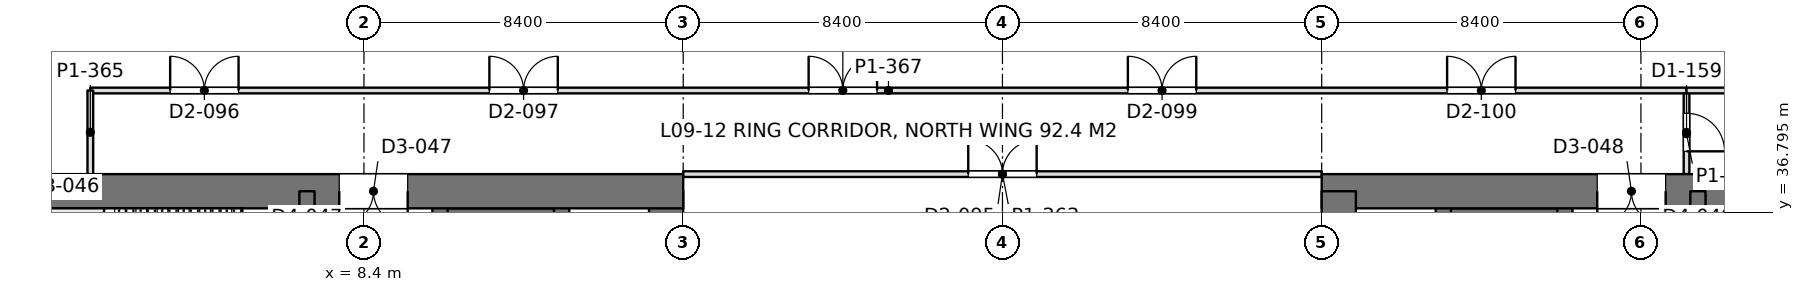
"""IFC4 building model, lengths in metres.
Left out: names, types, materials, properties, quantities, classifications, styles, units other than length and angle.
Written with IfcOpenShell. Run it as: python <this file> out.ifc"""

import sys

from ifc_helpers import new_model, si_unit, direction, frame, frame_2d, origin, place, context, subcontext, project, spatial, rectangle, extrude, element, fill, save


model = new_model("IFC4")
c1 = context("Model", 3, precision=1e-05, world=origin(), true_north=direction((0.0, 1.0)))
c2 = subcontext(c1, "Body", "Model", "MODEL_VIEW")
j1 = project(units=[si_unit("LENGTHUNIT", "METRE"), si_unit("PLANEANGLEUNIT", "RADIAN")], contexts=[c1])
p1 = place(None, origin())
s1 = spatial("IfcSite", under=j1, at=p1, CompositionType="ELEMENT")
p2 = place(p1, origin())
s2 = spatial("IfcBuilding", under=s1, at=p2, CompositionType="ELEMENT")
p3 = place(p2, frame((0.0, 0.0, 41.4)))
s3 = spatial("IfcBuildingStorey", under=s2, at=p3, CompositionType="ELEMENT", Elevation=41.4)
p4 = place(p3, frame((-1.2, 37.35, 0.0), z_axis=(0.0, 0.0, 1.0), x_axis=(1.0, 0.0, 0.0)))
e1 = element("IfcWall", 1, at=p4, inside=s3, PredefinedType="SHEAR", context=c2, shape_type="SweptSolid", body=[
    extrude(rectangle(XDim=18.0, YDim=0.9, at=frame_2d((9.0, 0.0))), origin(), (0.0, 0.0, 1.0), 4.5),
])
p5 = place(p4, frame((8.95, 0.0, 0.0)))
e2 = element("IfcOpeningElement", 2, at=p5, cuts=e1, PredefinedType="OPENING", context=c2, shape_type="SweptSolid", body=[
    extrude(rectangle(XDim=1.8, YDim=2.4, at=frame_2d((0.9, 1.2))), frame((0.0, 0.46, 0.0), z_axis=(0.0, -1.0, 0.0), x_axis=(1.0, 0.0, 0.0)), (0.0, 0.0, 1.0), 0.92),
])
p6 = place(p3, frame((16.35, 13.05, 0.0), z_axis=(0.0, 0.0, 1.0), x_axis=(0.0, 1.0, 0.0)))
e3 = element("IfcWall", 3, at=p6, inside=s3, PredefinedType="SHEAR", context=c2, shape_type="SweptSolid", body=[
    extrude(rectangle(XDim=24.3, YDim=0.9, at=frame_2d((12.15, 0.0))), origin(), (0.0, 0.0, 1.0), 4.5),
])
p7 = place(p3, frame((6.9, 13.05, 0.0), z_axis=(0.0, 0.0, 1.0), x_axis=(0.0, 1.0, 0.0)))
e4 = element("IfcWall", 4, at=p7, inside=s3, PredefinedType="SHEAR", context=c2, shape_type="SweptSolid", body=[
    extrude(rectangle(XDim=24.3, YDim=0.4, at=frame_2d((12.15, 0.0))), origin(), (0.0, 0.0, 1.0), 4.5),
])
p8 = place(p7, frame((1.3, 0.0, 0.0)))
e5 = element("IfcOpeningElement", 5, at=p8, cuts=e4, PredefinedType="OPENING", context=c2, shape_type="SweptSolid", body=[
    extrude(rectangle(XDim=1.0, YDim=2.2, at=frame_2d((0.5, 1.1))), frame((0.0, 0.21, 0.0), z_axis=(0.0, -1.0, 0.0), x_axis=(1.0, 0.0, 0.0)), (0.0, 0.0, 1.0), 0.42),
])
p9 = place(p7, frame((22.0, 0.0, 0.0)))
e6 = element("IfcOpeningElement", 6, at=p9, cuts=e4, PredefinedType="OPENING", context=c2, shape_type="SweptSolid", body=[
    extrude(rectangle(XDim=1.0, YDim=2.2, at=frame_2d((0.5, 1.1))), frame((0.0, 0.21, 0.0), z_axis=(0.0, -1.0, 0.0), x_axis=(1.0, 0.0, 0.0)), (0.0, 0.0, 1.0), 0.42),
])
p10 = place(p7, frame((5.55, 0.0, 0.0)))
e7 = element("IfcOpeningElement", 7, at=p10, cuts=e4, PredefinedType="OPENING", context=c2, shape_type="SweptSolid", body=[
    extrude(rectangle(XDim=1.0, YDim=2.2, at=frame_2d((0.5, 1.1))), frame((0.0, 0.21, 0.0), z_axis=(0.0, -1.0, 0.0), x_axis=(1.0, 0.0, 0.0)), (0.0, 0.0, 1.0), 0.42),
])
p11 = place(p7, frame((9.55, 0.0, 0.0)))
e8 = element("IfcOpeningElement", 8, at=p11, cuts=e4, PredefinedType="OPENING", context=c2, shape_type="SweptSolid", body=[
    extrude(rectangle(XDim=1.0, YDim=2.2, at=frame_2d((0.5, 1.1))), frame((0.0, 0.21, 0.0), z_axis=(0.0, -1.0, 0.0), x_axis=(1.0, 0.0, 0.0)), (0.0, 0.0, 1.0), 0.42),
])
p12 = place(p7, frame((12.8, 0.0, 0.0)))
e9 = element("IfcOpeningElement", 9, at=p12, cuts=e4, PredefinedType="OPENING", context=c2, shape_type="SweptSolid", body=[
    extrude(rectangle(XDim=1.1, YDim=2.2, at=frame_2d((0.55, 1.1))), frame((0.0, 0.21, 0.0), z_axis=(0.0, -1.0, 0.0), x_axis=(1.0, 0.0, 0.0)), (0.0, 0.0, 1.0), 0.42),
])
p13 = place(p7, frame((15.538, 0.0, 0.0)))
e10 = element("IfcOpeningElement", 10, at=p13, cuts=e4, PredefinedType="OPENING", context=c2, shape_type="SweptSolid", body=[
    extrude(rectangle(XDim=1.1, YDim=2.2, at=frame_2d((0.55, 1.1))), frame((0.0, 0.21, 0.0), z_axis=(0.0, -1.0, 0.0), x_axis=(1.0, 0.0, 0.0)), (0.0, 0.0, 1.0), 0.42),
])
p14 = place(p7, frame((18.262, 0.0, 0.0)))
e11 = element("IfcOpeningElement", 11, at=p14, cuts=e4, PredefinedType="OPENING", context=c2, shape_type="SweptSolid", body=[
    extrude(rectangle(XDim=1.1, YDim=2.2, at=frame_2d((0.55, 1.1))), frame((0.0, 0.21, 0.0), z_axis=(0.0, -1.0, 0.0), x_axis=(1.0, 0.0, 0.0)), (0.0, 0.0, 1.0), 0.42),
])
p15 = place(p3, frame((10.4, 13.05, 0.0), z_axis=(0.0, 0.0, 1.0), x_axis=(0.0, 1.0, 0.0)))
e12 = element("IfcWall", 12, at=p15, inside=s3, PredefinedType="SHEAR", context=c2, shape_type="SweptSolid", body=[
    extrude(rectangle(XDim=24.3, YDim=0.4, at=frame_2d((12.15, 0.0))), origin(), (0.0, 0.0, 1.0), 4.5),
])
p16 = place(p15, frame((1.5, 0.0, 0.0)))
e13 = element("IfcOpeningElement", 13, at=p16, cuts=e12, PredefinedType="OPENING", context=c2, shape_type="SweptSolid", body=[
    extrude(rectangle(XDim=1.1, YDim=2.2, at=frame_2d((0.55, 1.1))), frame((0.0, 0.21, 0.0), z_axis=(0.0, -1.0, 0.0), x_axis=(1.0, 0.0, 0.0)), (0.0, 0.0, 1.0), 0.42),
])
p17 = place(p15, frame((4.35, 0.0, 0.0)))
e14 = element("IfcOpeningElement", 14, at=p17, cuts=e12, PredefinedType="OPENING", context=c2, shape_type="SweptSolid", body=[
    extrude(rectangle(XDim=1.1, YDim=2.2, at=frame_2d((0.55, 1.1))), frame((0.0, 0.21, 0.0), z_axis=(0.0, -1.0, 0.0), x_axis=(1.0, 0.0, 0.0)), (0.0, 0.0, 1.0), 0.42),
])
p18 = place(p15, frame((7.2, 0.0, 0.0)))
e15 = element("IfcOpeningElement", 15, at=p18, cuts=e12, PredefinedType="OPENING", context=c2, shape_type="SweptSolid", body=[
    extrude(rectangle(XDim=1.1, YDim=2.2, at=frame_2d((0.55, 1.1))), frame((0.0, 0.21, 0.0), z_axis=(0.0, -1.0, 0.0), x_axis=(1.0, 0.0, 0.0)), (0.0, 0.0, 1.0), 0.42),
])
p19 = place(p15, frame((21.45, 0.0, 0.0)))
e16 = element("IfcOpeningElement", 16, at=p19, cuts=e12, PredefinedType="OPENING", context=c2, shape_type="SweptSolid", body=[
    extrude(rectangle(XDim=1.1, YDim=2.2, at=frame_2d((0.55, 1.1))), frame((0.0, 0.21, 0.0), z_axis=(0.0, -1.0, 0.0), x_axis=(1.0, 0.0, 0.0)), (0.0, 0.0, 1.0), 0.42),
])
p20 = place(p3, frame((13.6, 13.05, 0.0), z_axis=(0.0, 0.0, 1.0), x_axis=(0.0, 1.0, 0.0)))
e17 = element("IfcWall", 17, at=p20, inside=s3, PredefinedType="SHEAR", context=c2, shape_type="SweptSolid", body=[
    extrude(rectangle(XDim=24.3, YDim=0.4, at=frame_2d((12.15, 0.0))), origin(), (0.0, 0.0, 1.0), 4.5),
])
p21 = place(p3, frame((10.4, 36.625, 0.0), z_axis=(0.0, 0.0, 1.0), x_axis=(1.0, 0.0, 0.0)))
e18 = element("IfcWall", 18, at=p21, inside=s3, PredefinedType="SHEAR", context=c2, shape_type="SweptSolid", body=[
    extrude(rectangle(XDim=3.2, YDim=0.55, at=frame_2d((1.6, 0.0))), origin(), (0.0, 0.0, 1.0), 4.5),
])
p22 = place(p3, frame((33.6, 37.35, 0.0), z_axis=(0.0, 0.0, 1.0), x_axis=(1.0, 0.0, 0.0)))
e19 = element("IfcWall", 19, at=p22, inside=s3, PredefinedType="SHEAR", context=c2, shape_type="SweptSolid", body=[
    extrude(rectangle(XDim=18.0, YDim=0.9, at=frame_2d((9.0, 0.0))), origin(), (0.0, 0.0, 1.0), 4.5),
])
p23 = place(p22, frame((7.25, 0.0, 0.0)))
e20 = element("IfcOpeningElement", 20, at=p23, cuts=e19, PredefinedType="OPENING", context=c2, shape_type="SweptSolid", body=[
    extrude(rectangle(XDim=1.8, YDim=2.4, at=frame_2d((0.9, 1.2))), frame((0.0, 0.46, 0.0), z_axis=(0.0, -1.0, 0.0), x_axis=(1.0, 0.0, 0.0)), (0.0, 0.0, 1.0), 0.92),
])
p24 = place(p3, frame((34.05, 13.05, 0.0), z_axis=(0.0, 0.0, 1.0), x_axis=(0.0, 1.0, 0.0)))
e21 = element("IfcWall", 21, at=p24, inside=s3, PredefinedType="SHEAR", context=c2, shape_type="SweptSolid", body=[
    extrude(rectangle(XDim=24.3, YDim=0.9, at=frame_2d((12.15, 0.0))), origin(), (0.0, 0.0, 1.0), 4.5),
])
p25 = place(p3, frame((43.5, 13.05, 0.0), z_axis=(0.0, 0.0, 1.0), x_axis=(0.0, 1.0, 0.0)))
e22 = element("IfcWall", 22, at=p25, inside=s3, PredefinedType="SHEAR", context=c2, shape_type="SweptSolid", body=[
    extrude(rectangle(XDim=24.3, YDim=0.4, at=frame_2d((12.15, 0.0))), origin(), (0.0, 0.0, 1.0), 4.5),
])
p26 = place(p25, frame((1.3, 0.0, 0.0)))
e23 = element("IfcOpeningElement", 23, at=p26, cuts=e22, PredefinedType="OPENING", context=c2, shape_type="SweptSolid", body=[
    extrude(rectangle(XDim=1.0, YDim=2.2, at=frame_2d((0.5, 1.1))), frame((0.0, 0.21, 0.0), z_axis=(0.0, -1.0, 0.0), x_axis=(1.0, 0.0, 0.0)), (0.0, 0.0, 1.0), 0.42),
])
p27 = place(p25, frame((22.0, 0.0, 0.0)))
e24 = element("IfcOpeningElement", 24, at=p27, cuts=e22, PredefinedType="OPENING", context=c2, shape_type="SweptSolid", body=[
    extrude(rectangle(XDim=1.0, YDim=2.2, at=frame_2d((0.5, 1.1))), frame((0.0, 0.21, 0.0), z_axis=(0.0, -1.0, 0.0), x_axis=(1.0, 0.0, 0.0)), (0.0, 0.0, 1.0), 0.42),
])
p28 = place(p25, frame((5.55, 0.0, 0.0)))
e25 = element("IfcOpeningElement", 25, at=p28, cuts=e22, PredefinedType="OPENING", context=c2, shape_type="SweptSolid", body=[
    extrude(rectangle(XDim=1.0, YDim=2.2, at=frame_2d((0.5, 1.1))), frame((0.0, 0.21, 0.0), z_axis=(0.0, -1.0, 0.0), x_axis=(1.0, 0.0, 0.0)), (0.0, 0.0, 1.0), 0.42),
])
p29 = place(p25, frame((9.55, 0.0, 0.0)))
e26 = element("IfcOpeningElement", 26, at=p29, cuts=e22, PredefinedType="OPENING", context=c2, shape_type="SweptSolid", body=[
    extrude(rectangle(XDim=1.0, YDim=2.2, at=frame_2d((0.5, 1.1))), frame((0.0, 0.21, 0.0), z_axis=(0.0, -1.0, 0.0), x_axis=(1.0, 0.0, 0.0)), (0.0, 0.0, 1.0), 0.42),
])
p30 = place(p25, frame((12.8, 0.0, 0.0)))
e27 = element("IfcOpeningElement", 27, at=p30, cuts=e22, PredefinedType="OPENING", context=c2, shape_type="SweptSolid", body=[
    extrude(rectangle(XDim=1.1, YDim=2.2, at=frame_2d((0.55, 1.1))), frame((0.0, 0.21, 0.0), z_axis=(0.0, -1.0, 0.0), x_axis=(1.0, 0.0, 0.0)), (0.0, 0.0, 1.0), 0.42),
])
p31 = place(p25, frame((15.538, 0.0, 0.0)))
e28 = element("IfcOpeningElement", 28, at=p31, cuts=e22, PredefinedType="OPENING", context=c2, shape_type="SweptSolid", body=[
    extrude(rectangle(XDim=1.1, YDim=2.2, at=frame_2d((0.55, 1.1))), frame((0.0, 0.21, 0.0), z_axis=(0.0, -1.0, 0.0), x_axis=(1.0, 0.0, 0.0)), (0.0, 0.0, 1.0), 0.42),
])
p32 = place(p25, frame((18.262, 0.0, 0.0)))
e29 = element("IfcOpeningElement", 29, at=p32, cuts=e22, PredefinedType="OPENING", context=c2, shape_type="SweptSolid", body=[
    extrude(rectangle(XDim=1.1, YDim=2.2, at=frame_2d((0.55, 1.1))), frame((0.0, 0.21, 0.0), z_axis=(0.0, -1.0, 0.0), x_axis=(1.0, 0.0, 0.0)), (0.0, 0.0, 1.0), 0.42),
])
p33 = place(p3, frame((40.0, 13.05, 0.0), z_axis=(0.0, 0.0, 1.0), x_axis=(0.0, 1.0, 0.0)))
e30 = element("IfcWall", 30, at=p33, inside=s3, PredefinedType="SHEAR", context=c2, shape_type="SweptSolid", body=[
    extrude(rectangle(XDim=24.3, YDim=0.4, at=frame_2d((12.15, 0.0))), origin(), (0.0, 0.0, 1.0), 4.5),
])
p34 = place(p33, frame((1.5, 0.0, 0.0)))
e31 = element("IfcOpeningElement", 31, at=p34, cuts=e30, PredefinedType="OPENING", context=c2, shape_type="SweptSolid", body=[
    extrude(rectangle(XDim=1.1, YDim=2.2, at=frame_2d((0.55, 1.1))), frame((0.0, 0.21, 0.0), z_axis=(0.0, -1.0, 0.0), x_axis=(1.0, 0.0, 0.0)), (0.0, 0.0, 1.0), 0.42),
])
p35 = place(p33, frame((4.35, 0.0, 0.0)))
e32 = element("IfcOpeningElement", 32, at=p35, cuts=e30, PredefinedType="OPENING", context=c2, shape_type="SweptSolid", body=[
    extrude(rectangle(XDim=1.1, YDim=2.2, at=frame_2d((0.55, 1.1))), frame((0.0, 0.21, 0.0), z_axis=(0.0, -1.0, 0.0), x_axis=(1.0, 0.0, 0.0)), (0.0, 0.0, 1.0), 0.42),
])
p36 = place(p33, frame((7.2, 0.0, 0.0)))
e33 = element("IfcOpeningElement", 33, at=p36, cuts=e30, PredefinedType="OPENING", context=c2, shape_type="SweptSolid", body=[
    extrude(rectangle(XDim=1.1, YDim=2.2, at=frame_2d((0.55, 1.1))), frame((0.0, 0.21, 0.0), z_axis=(0.0, -1.0, 0.0), x_axis=(1.0, 0.0, 0.0)), (0.0, 0.0, 1.0), 0.42),
])
p37 = place(p33, frame((21.45, 0.0, 0.0)))
e34 = element("IfcOpeningElement", 34, at=p37, cuts=e30, PredefinedType="OPENING", context=c2, shape_type="SweptSolid", body=[
    extrude(rectangle(XDim=1.1, YDim=2.2, at=frame_2d((0.55, 1.1))), frame((0.0, 0.21, 0.0), z_axis=(0.0, -1.0, 0.0), x_axis=(1.0, 0.0, 0.0)), (0.0, 0.0, 1.0), 0.42),
])
p38 = place(p3, frame((36.8, 13.05, 0.0), z_axis=(0.0, 0.0, 1.0), x_axis=(0.0, 1.0, 0.0)))
e35 = element("IfcWall", 35, at=p38, inside=s3, PredefinedType="SHEAR", context=c2, shape_type="SweptSolid", body=[
    extrude(rectangle(XDim=24.3, YDim=0.4, at=frame_2d((12.15, 0.0))), origin(), (0.0, 0.0, 1.0), 4.5),
])
p39 = place(p3, frame((40.0, 36.625, 0.0), z_axis=(0.0, 0.0, 1.0), x_axis=(-1.0, 0.0, 0.0)))
e36 = element("IfcWall", 36, at=p39, inside=s3, PredefinedType="SHEAR", context=c2, shape_type="SweptSolid", body=[
    extrude(rectangle(XDim=3.2, YDim=0.55, at=frame_2d((1.6, 0.0))), origin(), (0.0, 0.0, 1.0), 4.5),
])
p40 = place(p3, frame((1.2, 40.0, 0.0), z_axis=(0.0, 0.0, 1.0), x_axis=(1.0, 0.0, 0.0)))
e37 = element("IfcWall", 37, at=p40, inside=s3, PredefinedType="PARTITIONING", context=c2, shape_type="SweptSolid", body=[
    extrude(rectangle(XDim=42.002, YDim=0.15, at=frame_2d((21.001, 0.0))), origin(), (0.0, 0.0, 1.0), 3.74),
])
p41 = place(p40, frame((2.1, 0.0, 0.0)))
e38 = element("IfcOpeningElement", 38, at=p41, cuts=e37, PredefinedType="OPENING", context=c2, shape_type="SweptSolid", body=[
    extrude(rectangle(XDim=1.8, YDim=2.2, at=frame_2d((0.9, 1.1))), frame((0.0, 0.085, 0.0), z_axis=(0.0, -1.0, 0.0), x_axis=(1.0, 0.0, 0.0)), (0.0, 0.0, 1.0), 0.17),
])
p42 = place(p40, frame((10.5, 0.0, 0.0)))
e39 = element("IfcOpeningElement", 39, at=p42, cuts=e37, PredefinedType="OPENING", context=c2, shape_type="SweptSolid", body=[
    extrude(rectangle(XDim=1.8, YDim=2.2, at=frame_2d((0.9, 1.1))), frame((0.0, 0.085, 0.0), z_axis=(0.0, -1.0, 0.0), x_axis=(1.0, 0.0, 0.0)), (0.0, 0.0, 1.0), 0.17),
])
p43 = place(p40, frame((18.9, 0.0, 0.0)))
e40 = element("IfcOpeningElement", 40, at=p43, cuts=e37, PredefinedType="OPENING", context=c2, shape_type="SweptSolid", body=[
    extrude(rectangle(XDim=1.8, YDim=2.2, at=frame_2d((0.9, 1.1))), frame((0.0, 0.085, 0.0), z_axis=(0.0, -1.0, 0.0), x_axis=(1.0, 0.0, 0.0)), (0.0, 0.0, 1.0), 0.17),
])
p44 = place(p40, frame((27.3, 0.0, 0.0)))
e41 = element("IfcOpeningElement", 41, at=p44, cuts=e37, PredefinedType="OPENING", context=c2, shape_type="SweptSolid", body=[
    extrude(rectangle(XDim=1.8, YDim=2.2, at=frame_2d((0.9, 1.1))), frame((0.0, 0.085, 0.0), z_axis=(0.0, -1.0, 0.0), x_axis=(1.0, 0.0, 0.0)), (0.0, 0.0, 1.0), 0.17),
])
p45 = place(p40, frame((35.7, 0.0, 0.0)))
e42 = element("IfcOpeningElement", 42, at=p45, cuts=e37, PredefinedType="OPENING", context=c2, shape_type="SweptSolid", body=[
    extrude(rectangle(XDim=1.8, YDim=2.2, at=frame_2d((0.9, 1.1))), frame((0.0, 0.085, 0.0), z_axis=(0.0, -1.0, 0.0), x_axis=(1.0, 0.0, 0.0)), (0.0, 0.0, 1.0), 0.17),
])
p46 = place(p3, frame((1.2, 37.8, 0.0), z_axis=(0.0, 0.0, 1.0), x_axis=(0.0, 1.0, 0.0)))
e43 = element("IfcWall", 43, at=p46, inside=s3, PredefinedType="PARTITIONING", context=c2, shape_type="SweptSolid", body=[
    extrude(rectangle(XDim=2.2, YDim=0.15, at=frame_2d((1.1, 0.0))), origin(), (0.0, 0.0, 1.0), 4.34),
])
p47 = place(p3, frame((43.2, 37.8, 0.0), z_axis=(0.0, 0.0, 1.0), x_axis=(0.0, 1.0, 0.0)))
e44 = element("IfcWall", 44, at=p47, inside=s3, PredefinedType="PARTITIONING", context=c2, shape_type="SweptSolid", body=[
    extrude(rectangle(XDim=2.126, YDim=0.15, at=frame_2d((1.063, 0.0))), origin(), (0.0, 0.0, 1.0), 4.34),
])
p48 = place(p47, frame((0.6, 0.0, 0.0)))
e45 = element("IfcOpeningElement", 45, at=p48, cuts=e44, PredefinedType="OPENING", context=c2, shape_type="SweptSolid", body=[
    extrude(rectangle(XDim=1.0, YDim=2.2, at=frame_2d((0.5, 1.1))), frame((0.0, 0.085, 0.0), z_axis=(0.0, -1.0, 0.0), x_axis=(1.0, 0.0, 0.0)), (0.0, 0.0, 1.0), 0.17),
])
p49 = place(p3, frame((43.198, 40.0, 0.0), z_axis=(0.0, 0.0, 1.0), x_axis=(1.0, 0.0, 0.0)))
e46 = element("IfcWall", 46, at=p49, inside=s3, PredefinedType="PARTITIONING", context=c2, shape_type="SweptSolid", body=[
    extrude(rectangle(XDim=6.002, YDim=0.15, at=frame_2d((3.001, 0.0))), origin(), (0.0, 0.0, 1.0), 3.98),
])
p50 = place(p3, frame((16.798, 37.8, 0.0), z_axis=(0.0, 0.0, 1.0), x_axis=(1.0, 0.0, 0.0)))
e47 = element("IfcWall", 47, at=p50, inside=s3, PredefinedType="PARTITIONING", context=c2, shape_type="SweptSolid", body=[
    extrude(rectangle(XDim=16.804, YDim=0.15, at=frame_2d((8.402, 0.0))), origin(), (0.0, 0.0, 1.0), 3.74),
])
p51 = place(p50, frame((7.502, 0.0, 0.0)))
e48 = element("IfcOpeningElement", 48, at=p51, cuts=e47, PredefinedType="OPENING", context=c2, shape_type="SweptSolid", body=[
    extrude(rectangle(XDim=1.8, YDim=2.2, at=frame_2d((0.9, 1.1))), frame((0.0, 0.085, 0.0), z_axis=(0.0, -1.0, 0.0), x_axis=(1.0, 0.0, 0.0)), (0.0, 0.0, 1.0), 0.17),
])
p52 = place(p5, frame((1.8, 0.0, 0.0), z_axis=(0.0, 0.0, 1.0), x_axis=(-1.0, 0.0, 0.0)))
e49 = element("IfcDoor", 49, at=p52, inside=s3, OperationType="DOUBLE_DOOR_SINGLE_SWING", PredefinedType="DOOR", context=c2, shape_type="SweptSolid", body=[
    extrude(rectangle(XDim=1.8, YDim=2.4, at=frame_2d((0.9, 1.2))), frame((0.0, 0.025, 0.0), z_axis=(0.0, -1.0, 0.0), x_axis=(1.0, 0.0, 0.0)), (0.0, 0.0, 1.0), 0.05),
])
fill(e2, e49)
p53 = place(p23, frame((1.8, 0.0, 0.0), z_axis=(0.0, 0.0, 1.0), x_axis=(-1.0, 0.0, 0.0)))
e50 = element("IfcDoor", 50, at=p53, inside=s3, OperationType="DOUBLE_DOOR_SINGLE_SWING", PredefinedType="DOOR", context=c2, shape_type="SweptSolid", body=[
    extrude(rectangle(XDim=1.8, YDim=2.4, at=frame_2d((0.9, 1.2))), frame((0.0, 0.025, 0.0), z_axis=(0.0, -1.0, 0.0), x_axis=(1.0, 0.0, 0.0)), (0.0, 0.0, 1.0), 0.05),
])
fill(e20, e50)
p54 = place(p41, origin())
e51 = element("IfcDoor", 51, at=p54, inside=s3, OperationType="DOUBLE_DOOR_SINGLE_SWING", PredefinedType="DOOR", context=c2, shape_type="SweptSolid", body=[
    extrude(rectangle(XDim=1.8, YDim=2.2, at=frame_2d((0.9, 1.1))), frame((0.0, 0.025, 0.0), z_axis=(0.0, -1.0, 0.0), x_axis=(1.0, 0.0, 0.0)), (0.0, 0.0, 1.0), 0.05),
])
fill(e38, e51)
p55 = place(p42, origin())
e52 = element("IfcDoor", 52, at=p55, inside=s3, OperationType="DOUBLE_DOOR_SINGLE_SWING", PredefinedType="DOOR", context=c2, shape_type="SweptSolid", body=[
    extrude(rectangle(XDim=1.8, YDim=2.2, at=frame_2d((0.9, 1.1))), frame((0.0, 0.025, 0.0), z_axis=(0.0, -1.0, 0.0), x_axis=(1.0, 0.0, 0.0)), (0.0, 0.0, 1.0), 0.05),
])
fill(e39, e52)
p56 = place(p43, origin())
e53 = element("IfcDoor", 53, at=p56, inside=s3, OperationType="DOUBLE_DOOR_SINGLE_SWING", PredefinedType="DOOR", context=c2, shape_type="SweptSolid", body=[
    extrude(rectangle(XDim=1.8, YDim=2.2, at=frame_2d((0.9, 1.1))), frame((0.0, 0.025, 0.0), z_axis=(0.0, -1.0, 0.0), x_axis=(1.0, 0.0, 0.0)), (0.0, 0.0, 1.0), 0.05),
])
fill(e40, e53)
p57 = place(p44, origin())
e54 = element("IfcDoor", 54, at=p57, inside=s3, OperationType="DOUBLE_DOOR_SINGLE_SWING", PredefinedType="DOOR", context=c2, shape_type="SweptSolid", body=[
    extrude(rectangle(XDim=1.8, YDim=2.2, at=frame_2d((0.9, 1.1))), frame((0.0, 0.025, 0.0), z_axis=(0.0, -1.0, 0.0), x_axis=(1.0, 0.0, 0.0)), (0.0, 0.0, 1.0), 0.05),
])
fill(e41, e54)
p58 = place(p45, origin())
e55 = element("IfcDoor", 55, at=p58, inside=s3, OperationType="DOUBLE_DOOR_SINGLE_SWING", PredefinedType="DOOR", context=c2, shape_type="SweptSolid", body=[
    extrude(rectangle(XDim=1.8, YDim=2.2, at=frame_2d((0.9, 1.1))), frame((0.0, 0.025, 0.0), z_axis=(0.0, -1.0, 0.0), x_axis=(1.0, 0.0, 0.0)), (0.0, 0.0, 1.0), 0.05),
])
fill(e42, e55)
p59 = place(p48, frame((1.0, 0.0, 0.0), z_axis=(0.0, 0.0, 1.0), x_axis=(-1.0, 0.0, 0.0)))
e56 = element("IfcDoor", 56, at=p59, inside=s3, OperationType="SINGLE_SWING_RIGHT", PredefinedType="DOOR", context=c2, shape_type="SweptSolid", body=[
    extrude(rectangle(XDim=1.0, YDim=2.2, at=frame_2d((0.5, 1.1))), frame((0.0, 0.025, 0.0), z_axis=(0.0, -1.0, 0.0), x_axis=(1.0, 0.0, 0.0)), (0.0, 0.0, 1.0), 0.05),
])
fill(e45, e56)
p60 = place(p51, origin())
e57 = element("IfcDoor", 57, at=p60, inside=s3, OperationType="DOUBLE_DOOR_SINGLE_SWING", PredefinedType="DOOR", context=c2, shape_type="SweptSolid", body=[
    extrude(rectangle(XDim=1.8, YDim=2.2, at=frame_2d((0.9, 1.1))), frame((0.0, 0.025, 0.0), z_axis=(0.0, -1.0, 0.0), x_axis=(1.0, 0.0, 0.0)), (0.0, 0.0, 1.0), 0.05),
])
fill(e48, e57)
save(model, sys.argv[1])
